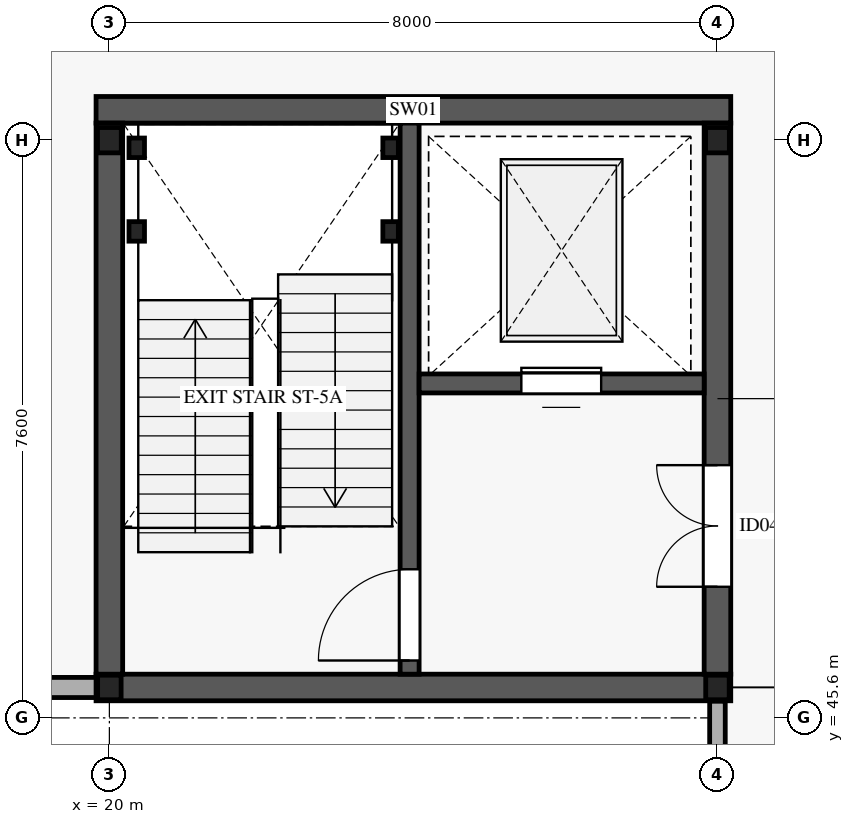
"""IFC4 building model, lengths in metres.
Left out: names, types, materials, properties, quantities, classifications, styles, units other than length and angle.
Written with IfcOpenShell. Run it as: python <this file> out.ifc"""

import sys

from ifc_helpers import new_model, si_unit, direction, frame, frame_2d, origin, origin_2d, place, context, subcontext, project, spatial, rectangle, i_section, extrude, element, fill, save


model = new_model("IFC4")
c1 = context("Model", 3, precision=1e-05, world=origin(), true_north=direction((0.0, 1.0)))
c2 = subcontext(c1, "Body", "Model", "MODEL_VIEW")
j1 = project(units=[si_unit("LENGTHUNIT", "METRE"), si_unit("PLANEANGLEUNIT", "RADIAN")], contexts=[c1])
p1 = place(None, origin())
s1 = spatial("IfcSite", under=j1, at=p1, CompositionType="ELEMENT")
p2 = place(p1, origin())
s2 = spatial("IfcBuilding", under=s1, at=p2, CompositionType="ELEMENT")
p3 = place(p2, frame((0.0, 0.0, 15.6)))
s3 = spatial("IfcBuildingStorey", under=s2, at=p3, CompositionType="ELEMENT", Elevation=15.6)
p4 = place(p3, frame((20.0, 46.0, 0.0), z_axis=(0.0, 0.0, 1.0), x_axis=(1.0, 0.0, 0.0)))
e1 = element("IfcColumn", 1, at=p4, inside=s3, PredefinedType="COLUMN", context=c2, shape_type="SweptSolid", body=[
    extrude(i_section(OverallWidth=0.309, OverallDepth=0.323, WebThickness=0.014, FlangeThickness=0.023, FilletRadius=0.015, at=origin_2d()), origin(), (0.0, 0.0, 1.0), 4.59),
])
p5 = place(p3, frame((20.0, 53.2, 0.0), z_axis=(0.0, 0.0, 1.0), x_axis=(1.0, 0.0, 0.0)))
e2 = element("IfcColumn", 2, at=p5, inside=s3, PredefinedType="COLUMN", context=c2, shape_type="SweptSolid", body=[
    extrude(i_section(OverallWidth=0.313, OverallDepth=0.333, WebThickness=0.018, FlangeThickness=0.028, FilletRadius=0.015, at=origin_2d()), origin(), (0.0, 0.0, 1.0), 4.59),
])
p6 = place(p3, frame((28.0, 46.0, 0.0), z_axis=(0.0, 0.0, 1.0), x_axis=(1.0, 0.0, 0.0)))
e3 = element("IfcColumn", 3, at=p6, inside=s3, PredefinedType="COLUMN", context=c2, shape_type="SweptSolid", body=[
    extrude(i_section(OverallWidth=0.309, OverallDepth=0.323, WebThickness=0.014, FlangeThickness=0.023, FilletRadius=0.015, at=origin_2d()), origin(), (0.0, 0.0, 1.0), 4.59),
])
p7 = place(p3, frame((28.0, 53.2, 0.0), z_axis=(0.0, 0.0, 1.0), x_axis=(1.0, 0.0, 0.0)))
e4 = element("IfcColumn", 4, at=p7, inside=s3, PredefinedType="COLUMN", context=c2, shape_type="SweptSolid", body=[
    extrude(i_section(OverallWidth=0.313, OverallDepth=0.333, WebThickness=0.018, FlangeThickness=0.028, FilletRadius=0.015, at=origin_2d()), origin(), (0.0, 0.0, 1.0), 4.59),
])
p8 = place(p3, frame((20.02, 46.0, 0.0), z_axis=(0.0, 0.0, 1.0), x_axis=(-1.0, 0.0, 0.0)))
e5 = element("IfcWall", 5, at=p8, inside=s3, PredefinedType="STANDARD", context=c2, shape_type="SweptSolid", body=[
    extrude(rectangle(XDim=8.04, YDim=0.265, at=frame_2d((4.02, 0.0))), origin(), (0.0, 0.0, 1.0), 3.66),
])
p9 = place(p8, frame((2.62, 0.0, 0.75)))
e6 = element("IfcOpeningElement", 6, at=p9, cuts=e5, PredefinedType="OPENING", context=c2, shape_type="SweptSolid", body=[
    extrude(rectangle(XDim=2.8, YDim=2.0, at=frame_2d((1.4, 1.0))), frame((0.0, 0.142, 0.0), z_axis=(0.0, -1.0, 0.0), x_axis=(1.0, 0.0, 0.0)), (0.0, 0.0, 1.0), 0.285),
])
p10 = place(p3, frame((28.0, 22.98, 0.0), z_axis=(0.0, 0.0, 1.0), x_axis=(0.0, 1.0, 0.0)))
e7 = element("IfcWall", 7, at=p10, inside=s3, PredefinedType="STANDARD", context=c2, shape_type="SweptSolid", body=[
    extrude(rectangle(XDim=22.84, YDim=0.205, at=frame_2d((11.42, 0.0))), origin(), (0.0, 0.0, 1.0), 4.02),
])
p11 = place(p10, frame((10.195, 0.0, 0.85)))
e8 = element("IfcOpeningElement", 8, at=p11, cuts=e7, PredefinedType="OPENING", context=c2, shape_type="SweptSolid", body=[
    extrude(rectangle(XDim=2.45, YDim=1.55, at=frame_2d((1.225, 0.775))), frame((0.0, 0.113, 0.0), z_axis=(0.0, -1.0, 0.0), x_axis=(1.0, 0.0, 0.0)), (0.0, 0.0, 1.0), 0.225),
])
for number, where, z_axis, x_axis in (
    (9, (19.825, 46.0, 0.0), (0.0, 0.0, 1.0), (1.0, 0.0, 0.0)),
    (10, (19.825, 53.6, 0.0), (0.0, 0.0, 1.0), (1.0, 0.0, 0.0)),
):
    element("IfcWall", number, at=place(p3, frame(where, z_axis=z_axis, x_axis=x_axis)), inside=s3, PredefinedType="SHEAR", context=c2, shape_type="SweptSolid", body=[
        extrude(rectangle(XDim=8.35, YDim=0.35, at=frame_2d((4.175, 0.0))), origin(), (0.0, 0.0, 1.0), 4.59),
    ])
p12 = place(p3, frame((20.0, 46.175, 0.0), z_axis=(0.0, 0.0, 1.0), x_axis=(0.0, 1.0, 0.0)))
e11 = element("IfcWall", 11, at=p12, inside=s3, PredefinedType="SHEAR", context=c2, shape_type="SweptSolid", body=[
    extrude(rectangle(XDim=7.25, YDim=0.35, at=frame_2d((3.625, 0.0))), origin(), (0.0, 0.0, 1.0), 4.59),
])
p13 = place(p3, frame((28.0, 46.175, 0.0), z_axis=(0.0, 0.0, 1.0), x_axis=(0.0, 1.0, 0.0)))
e12 = element("IfcWall", 12, at=p13, inside=s3, PredefinedType="SHEAR", context=c2, shape_type="SweptSolid", body=[
    extrude(rectangle(XDim=7.25, YDim=0.35, at=frame_2d((3.625, 0.0))), origin(), (0.0, 0.0, 1.0), 4.59),
])
p14 = place(p13, frame((1.15, 0.0, 0.0)))
e13 = element("IfcOpeningElement", 13, at=p14, cuts=e12, PredefinedType="OPENING", context=c2, shape_type="SweptSolid", body=[
    extrude(rectangle(XDim=1.6, YDim=2.35, at=frame_2d((0.8, 1.175))), frame((0.0, 0.185, 0.0), z_axis=(0.0, -1.0, 0.0), x_axis=(1.0, 0.0, 0.0)), (0.0, 0.0, 1.0), 0.37),
])
p15 = place(p3, frame((23.95, 46.175, 0.0), z_axis=(0.0, 0.0, 1.0), x_axis=(0.0, 1.0, 0.0)))
e14 = element("IfcWall", 14, at=p15, inside=s3, PredefinedType="SHEAR", context=c2, shape_type="SweptSolid", body=[
    extrude(rectangle(XDim=7.25, YDim=0.25, at=frame_2d((3.625, 0.0))), origin(), (0.0, 0.0, 1.0), 4.59),
])
p16 = place(p15, frame((0.18, 0.0, 0.0)))
e15 = element("IfcOpeningElement", 15, at=p16, cuts=e14, PredefinedType="OPENING", context=c2, shape_type="SweptSolid", body=[
    extrude(rectangle(XDim=1.2, YDim=2.2, at=frame_2d((0.6, 1.1))), frame((0.0, 0.135, 0.0), z_axis=(0.0, -1.0, 0.0), x_axis=(1.0, 0.0, 0.0)), (0.0, 0.0, 1.0), 0.27),
])
p17 = place(p3, frame((24.075, 50.0, 0.0), z_axis=(0.0, 0.0, 1.0), x_axis=(1.0, 0.0, 0.0)))
e16 = element("IfcWall", 16, at=p17, inside=s3, PredefinedType="SHEAR", context=c2, shape_type="SweptSolid", body=[
    extrude(rectangle(XDim=3.75, YDim=0.25, at=frame_2d((1.875, 0.0))), origin(), (0.0, 0.0, 1.0), 4.59),
])
p18 = place(p17, frame((1.345, 0.0, 0.0)))
e17 = element("IfcOpeningElement", 17, at=p18, cuts=e16, PredefinedType="OPENING", context=c2, shape_type="SweptSolid", body=[
    extrude(rectangle(XDim=1.05, YDim=2.2, at=frame_2d((0.525, 1.1))), frame((0.0, 0.135, 0.0), z_axis=(0.0, -1.0, 0.0), x_axis=(1.0, 0.0, 0.0)), (0.0, 0.0, 1.0), 0.27),
])
for number, where, z_axis, x_axis in (
    (18, (20.36, 52.0, 0.0), (0.0, 0.0, 1.0), (1.0, 0.0, 0.0)),
    (19, (23.7, 52.0, 0.0), (0.0, 0.0, 1.0), (1.0, 0.0, 0.0)),
    (20, (20.36, 53.1, 0.0), (0.0, 0.0, 1.0), (1.0, 0.0, 0.0)),
    (21, (23.7, 53.1, 0.0), (0.0, 0.0, 1.0), (1.0, 0.0, 0.0)),
):
    element("IfcColumn", number, at=place(p3, frame(where, z_axis=z_axis, x_axis=x_axis)), inside=s3, PredefinedType="COLUMN", context=c2, shape_type="SweptSolid", body=[
        extrude(i_section(OverallWidth=0.204, OverallDepth=0.257, WebThickness=0.009, FlangeThickness=0.016, FilletRadius=0.013, at=origin_2d()), origin(), (0.0, 0.0, 1.0), 4.795),
    ])
p19 = place(p16, origin())
e22 = element("IfcDoor", 22, at=p19, inside=s3, OperationType="SINGLE_SWING_LEFT", PredefinedType="DOOR", context=c2, shape_type="SweptSolid", body=[
    extrude(rectangle(XDim=1.2, YDim=2.2, at=frame_2d((0.6, 1.1))), frame((0.0, 0.025, 0.0), z_axis=(0.0, -1.0, 0.0), x_axis=(1.0, 0.0, 0.0)), (0.0, 0.0, 1.0), 0.05),
])
fill(e15, e22)
p20 = place(p14, origin())
e23 = element("IfcDoor", 23, at=p20, inside=s3, OperationType="DOUBLE_DOOR_SINGLE_SWING", PredefinedType="DOOR", context=c2, shape_type="SweptSolid", body=[
    extrude(rectangle(XDim=1.6, YDim=2.35, at=frame_2d((0.8, 1.175))), frame((0.0, 0.025, 0.0), z_axis=(0.0, -1.0, 0.0), x_axis=(1.0, 0.0, 0.0)), (0.0, 0.0, 1.0), 0.05),
])
fill(e13, e23)
p21 = place(p18, origin())
e24 = element("IfcDoor", 24, at=p21, inside=s3, OperationType="SLIDING_TO_RIGHT", PredefinedType="DOOR", context=c2, shape_type="SweptSolid", body=[
    extrude(rectangle(XDim=1.05, YDim=2.2, at=frame_2d((0.525, 1.1))), frame((0.0, 0.025, 0.0), z_axis=(0.0, -1.0, 0.0), x_axis=(1.0, 0.0, 0.0)), (0.0, 0.0, 1.0), 0.05),
])
fill(e17, e24)
save(model, sys.argv[1])
